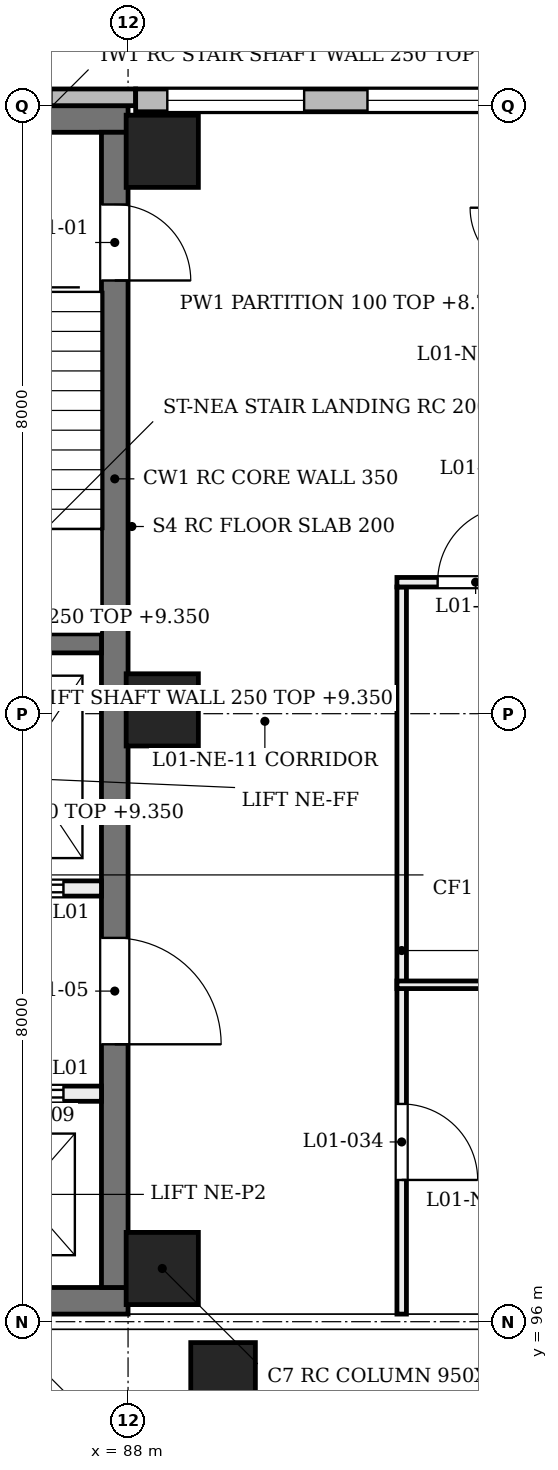
"""IFC4 building model, lengths in metres.
Left out: names, types, materials, properties, quantities, classifications, styles, units other than length and angle.
Written with IfcOpenShell. Run it as: python <this file> out.ifc"""

import sys

from ifc_helpers import new_model, si_unit, direction, frame, frame_2d, origin, origin_2d, place, context, subcontext, project, spatial, rectangle, extrude, element, fill, save


model = new_model("IFC4")
c1 = context("Model", 3, precision=1e-05, world=origin(), true_north=direction((0.0, 1.0)))
c2 = subcontext(c1, "Body", "Model", "MODEL_VIEW")
j1 = project(units=[si_unit("LENGTHUNIT", "METRE"), si_unit("PLANEANGLEUNIT", "RADIAN")], contexts=[c1])
p1 = place(None, origin())
s1 = spatial("IfcSite", under=j1, at=p1, CompositionType="ELEMENT")
p2 = place(p1, origin())
s2 = spatial("IfcBuilding", under=s1, at=p2, CompositionType="ELEMENT")
p3 = place(p2, frame((0.0, 0.0, 4.8)))
s3 = spatial("IfcBuildingStorey", under=s2, at=p3, CompositionType="ELEMENT", Elevation=4.8)
for number, where, z_axis, x_axis in (
    (1, (80.1, 96.275, 0.0), (0.0, 0.0, 1.0), (1.0, 0.0, 0.0)),
    (2, (80.1, 111.825, 0.0), (0.0, 0.0, 1.0), (1.0, 0.0, 0.0)),
):
    element("IfcWall", number, at=place(p3, frame(where, z_axis=z_axis, x_axis=x_axis)), inside=s3, PredefinedType="SHEAR", context=c2, shape_type="SweptSolid", body=[
        extrude(rectangle(XDim=7.9, YDim=0.35, at=frame_2d((3.95, 0.0))), origin(), (0.0, 0.0, 1.0), 4.58),
    ])
p4 = place(p3, frame((87.825, 96.45, 0.0), z_axis=(0.0, 0.0, 1.0), x_axis=(0.0, 1.0, 0.0)))
e3 = element("IfcWall", 3, at=p4, inside=s3, PredefinedType="SHEAR", context=c2, shape_type="SweptSolid", body=[
    extrude(rectangle(XDim=15.2, YDim=0.35, at=frame_2d((7.6, 0.0))), origin(), (0.0, 0.0, 1.0), 4.58),
])
p5 = place(p4, frame((13.25, 0.0, 0.0)))
e4 = element("IfcOpeningElement", 4, at=p5, cuts=e3, PredefinedType="OPENING", context=c2, shape_type="SweptSolid", body=[
    extrude(rectangle(XDim=1.0, YDim=2.1, at=frame_2d((0.5, 1.05))), frame((0.0, 0.185, 0.0), z_axis=(0.0, -1.0, 0.0), x_axis=(1.0, 0.0, 0.0)), (0.0, 0.0, 1.0), 0.37),
])
p6 = place(p4, frame((3.2, 0.0, 0.0)))
e5 = element("IfcOpeningElement", 5, at=p6, cuts=e3, PredefinedType="OPENING", context=c2, shape_type="SweptSolid", body=[
    extrude(rectangle(XDim=1.4, YDim=2.1, at=frame_2d((0.7, 1.05))), frame((0.0, 0.185, 0.0), z_axis=(0.0, -1.0, 0.0), x_axis=(1.0, 0.0, 0.0)), (0.0, 0.0, 1.0), 0.37),
])
for number, where, z_axis, x_axis in (
    (6, (88.45, 96.7, 0.0), (0.0, 0.0, 1.0), (1.0, 0.0, 0.0)),
    (7, (88.45, 104.05, 0.0), (0.0, 0.0, 1.0), (1.0, 0.0, 0.0)),
    (8, (88.45, 111.4, 0.0), (0.0, 0.0, 1.0), (1.0, 0.0, 0.0)),
):
    element("IfcColumn", number, at=place(p3, frame(where, z_axis=z_axis, x_axis=x_axis)), inside=s3, PredefinedType="COLUMN", context=c2, shape_type="SweptSolid", body=[
        extrude(rectangle(XDim=0.95, YDim=0.95, at=origin_2d()), origin(), (0.0, 0.0, 1.0), 4.8),
    ])
p7 = place(p3, frame((89.0, 95.3, 0.0), z_axis=(0.203952265704, 0.0, 0.978980833987), x_axis=(0.0, 1.0, 0.0)))
e9 = element("IfcColumn", 9, at=p7, inside=s3, PredefinedType="COLUMN", context=c2, shape_type="SweptSolid", body=[
    extrude(rectangle(XDim=0.85, YDim=0.85, at=origin_2d()), origin(), (0.0, 0.0, 1.0), 4.903),
])
p8 = place(p3, frame((79.9, 112.11, 0.0), z_axis=(0.0, 0.0, 1.0), x_axis=(1.0, 0.0, 0.0)))
e10 = element("IfcWall", 10, at=p8, inside=s3, PredefinedType="SOLIDWALL", context=c2, shape_type="SweptSolid", body=[
    extrude(rectangle(XDim=8.2, YDim=0.22, at=frame_2d((4.1, 0.0))), origin(), (0.0, 0.0, 1.0), 3.9),
])
p9 = place(p8, frame((1.308, 0.0, 0.9)))
e11 = element("IfcOpeningElement", 11, at=p9, cuts=e10, PredefinedType="OPENING", context=c2, shape_type="SweptSolid", body=[
    extrude(rectangle(XDim=0.45, YDim=2.6, at=frame_2d((0.225, 1.3))), frame((0.0, 0.12, 0.0), z_axis=(0.0, -1.0, 0.0), x_axis=(1.0, 0.0, 0.0)), (0.0, 0.0, 1.0), 0.24),
])
p10 = place(p8, frame((3.975, 0.0, 0.9)))
e12 = element("IfcOpeningElement", 12, at=p10, cuts=e10, PredefinedType="OPENING", context=c2, shape_type="SweptSolid", body=[
    extrude(rectangle(XDim=0.45, YDim=2.6, at=frame_2d((0.225, 1.3))), frame((0.0, 0.12, 0.0), z_axis=(0.0, -1.0, 0.0), x_axis=(1.0, 0.0, 0.0)), (0.0, 0.0, 1.0), 0.24),
])
p11 = place(p8, frame((6.642, 0.0, 0.9)))
e13 = element("IfcOpeningElement", 13, at=p11, cuts=e10, PredefinedType="OPENING", context=c2, shape_type="SweptSolid", body=[
    extrude(rectangle(XDim=0.45, YDim=2.6, at=frame_2d((0.225, 1.3))), frame((0.0, 0.12, 0.0), z_axis=(0.0, -1.0, 0.0), x_axis=(1.0, 0.0, 0.0)), (0.0, 0.0, 1.0), 0.24),
])
p12 = place(p3, frame((88.1, 112.07, 0.0), z_axis=(0.0, 0.0, 1.0), x_axis=(1.0, 0.0, 0.0)))
e14 = element("IfcWall", 14, at=p12, inside=s3, PredefinedType="SOLIDWALL", context=c2, shape_type="SweptSolid", body=[
    extrude(rectangle(XDim=7.9, YDim=0.3, at=frame_2d((3.95, 0.0))), origin(), (0.0, 0.0, 1.0), 3.9),
])
p13 = place(p12, frame((0.417, 0.0, 0.75)))
e15 = element("IfcOpeningElement", 15, at=p13, cuts=e14, PredefinedType="OPENING", context=c2, shape_type="SweptSolid", body=[
    extrude(rectangle(XDim=1.8, YDim=3.1, at=frame_2d((0.9, 1.55))), frame((0.0, 0.16, 0.0), z_axis=(0.0, -1.0, 0.0), x_axis=(1.0, 0.0, 0.0)), (0.0, 0.0, 1.0), 0.32),
])
p14 = place(p12, frame((3.05, 0.0, 0.75)))
e16 = element("IfcOpeningElement", 16, at=p14, cuts=e14, PredefinedType="OPENING", context=c2, shape_type="SweptSolid", body=[
    extrude(rectangle(XDim=1.8, YDim=3.1, at=frame_2d((0.9, 1.55))), frame((0.0, 0.16, 0.0), z_axis=(0.0, -1.0, 0.0), x_axis=(1.0, 0.0, 0.0)), (0.0, 0.0, 1.0), 0.32),
])
p15 = place(p12, frame((5.683, 0.0, 0.75)))
e17 = element("IfcOpeningElement", 17, at=p15, cuts=e14, PredefinedType="OPENING", context=c2, shape_type="SweptSolid", body=[
    extrude(rectangle(XDim=1.8, YDim=3.1, at=frame_2d((0.9, 1.55))), frame((0.0, 0.16, 0.0), z_axis=(0.0, -1.0, 0.0), x_axis=(1.0, 0.0, 0.0)), (0.0, 0.0, 1.0), 0.32),
])
p16 = place(p3, frame((87.65, 104.925, 0.0), z_axis=(0.0, 0.0, 1.0), x_axis=(-1.0, 0.0, 0.0)))
e18 = element("IfcWall", 18, at=p16, inside=s3, PredefinedType="SOLIDWALL", context=c2, shape_type="SweptSolid", body=[
    extrude(rectangle(XDim=3.1, YDim=0.25, at=frame_2d((1.55, 0.0))), origin(), (0.0, 0.0, 1.0), 4.55),
])
p17 = place(p3, frame((87.65, 101.7, 0.0), z_axis=(0.0, 0.0, 1.0), x_axis=(-1.0, 0.0, 0.0)))
e19 = element("IfcWall", 19, at=p17, inside=s3, PredefinedType="SOLIDWALL", context=c2, shape_type="SweptSolid", body=[
    extrude(rectangle(XDim=7.2, YDim=0.2, at=frame_2d((3.6, 0.0))), origin(), (0.0, 0.0, 1.0), 4.55),
])
p18 = place(p17, frame((0.5, 0.0, 0.0)))
e20 = element("IfcOpeningElement", 20, at=p18, cuts=e19, PredefinedType="OPENING", context=c2, shape_type="SweptSolid", body=[
    extrude(rectangle(XDim=1.1, YDim=2.1, at=frame_2d((0.55, 1.05))), frame((0.0, 0.11, 0.0), z_axis=(0.0, -1.0, 0.0), x_axis=(1.0, 0.0, 0.0)), (0.0, 0.0, 1.0), 0.22),
])
p19 = place(p17, frame((5.6, 0.0, 0.0)))
e21 = element("IfcOpeningElement", 21, at=p19, cuts=e19, PredefinedType="OPENING", context=c2, shape_type="SweptSolid", body=[
    extrude(rectangle(XDim=1.1, YDim=2.1, at=frame_2d((0.55, 1.05))), frame((0.0, 0.11, 0.0), z_axis=(0.0, -1.0, 0.0), x_axis=(1.0, 0.0, 0.0)), (0.0, 0.0, 1.0), 0.22),
])
p20 = place(p17, frame((3.1, 0.0, 0.0)))
e22 = element("IfcOpeningElement", 22, at=p20, cuts=e19, PredefinedType="OPENING", context=c2, shape_type="SweptSolid", body=[
    extrude(rectangle(XDim=1.0, YDim=2.1, at=frame_2d((0.5, 1.05))), frame((0.0, 0.11, 0.0), z_axis=(0.0, -1.0, 0.0), x_axis=(1.0, 0.0, 0.0)), (0.0, 0.0, 1.0), 0.22),
])
p21 = place(p3, frame((87.65, 99.0, 0.0), z_axis=(0.0, 0.0, 1.0), x_axis=(-1.0, 0.0, 0.0)))
e23 = element("IfcWall", 23, at=p21, inside=s3, PredefinedType="SOLIDWALL", context=c2, shape_type="SweptSolid", body=[
    extrude(rectangle(XDim=7.2, YDim=0.2, at=frame_2d((3.6, 0.0))), origin(), (0.0, 0.0, 1.0), 4.55),
])
p22 = place(p21, frame((0.5, 0.0, 0.0)))
e24 = element("IfcOpeningElement", 24, at=p22, cuts=e23, PredefinedType="OPENING", context=c2, shape_type="SweptSolid", body=[
    extrude(rectangle(XDim=1.1, YDim=2.1, at=frame_2d((0.55, 1.05))), frame((0.0, 0.11, 0.0), z_axis=(0.0, -1.0, 0.0), x_axis=(1.0, 0.0, 0.0)), (0.0, 0.0, 1.0), 0.22),
])
p23 = place(p21, frame((5.6, 0.0, 0.0)))
e25 = element("IfcOpeningElement", 25, at=p23, cuts=e23, PredefinedType="OPENING", context=c2, shape_type="SweptSolid", body=[
    extrude(rectangle(XDim=1.1, YDim=2.1, at=frame_2d((0.55, 1.05))), frame((0.0, 0.11, 0.0), z_axis=(0.0, -1.0, 0.0), x_axis=(1.0, 0.0, 0.0)), (0.0, 0.0, 1.0), 0.22),
])
p24 = place(p21, frame((3.1, 0.0, 0.0)))
e26 = element("IfcOpeningElement", 26, at=p24, cuts=e23, PredefinedType="OPENING", context=c2, shape_type="SweptSolid", body=[
    extrude(rectangle(XDim=1.0, YDim=2.1, at=frame_2d((0.5, 1.05))), frame((0.0, 0.11, 0.0), z_axis=(0.0, -1.0, 0.0), x_axis=(1.0, 0.0, 0.0)), (0.0, 0.0, 1.0), 0.22),
])
p25 = place(p3, frame((91.6, 96.1, 0.0), z_axis=(0.0, 0.0, 1.0), x_axis=(0.0, 1.0, 0.0)))
e27 = element("IfcWall", 27, at=p25, inside=s3, PredefinedType="PARTITIONING", context=c2, shape_type="SweptSolid", body=[
    extrude(rectangle(XDim=9.567, YDim=0.125, at=frame_2d((4.783, 0.0))), origin(), (0.0, 0.0, 1.0), 3.88),
])
p26 = place(p25, frame((1.765, 0.0, 0.0)))
e28 = element("IfcOpeningElement", 28, at=p26, cuts=e27, PredefinedType="OPENING", context=c2, shape_type="SweptSolid", body=[
    extrude(rectangle(XDim=1.0, YDim=2.1, at=frame_2d((0.5, 1.05))), frame((0.0, 0.073, 0.0), z_axis=(0.0, -1.0, 0.0), x_axis=(1.0, 0.0, 0.0)), (0.0, 0.0, 1.0), 0.145),
])
p27 = place(p3, frame((91.538, 100.433, 0.0), z_axis=(0.0, 0.0, 1.0), x_axis=(1.0, 0.0, 0.0)))
e29 = element("IfcWall", 29, at=p27, inside=s3, PredefinedType="PARTITIONING", context=c2, shape_type="SweptSolid", body=[
    extrude(rectangle(XDim=4.162, YDim=0.1, at=frame_2d((2.081, 0.0))), origin(), (0.0, 0.0, 1.0), 3.98),
])
p28 = place(p3, frame((91.538, 105.73, 0.0), z_axis=(0.0, 0.0, 1.0), x_axis=(1.0, 0.0, 0.0)))
e30 = element("IfcWall", 30, at=p28, inside=s3, PredefinedType="PARTITIONING", context=c2, shape_type="SweptSolid", body=[
    extrude(rectangle(XDim=1.925, YDim=0.125, at=frame_2d((0.962, 0.0))), origin(), (0.0, 0.0, 1.0), 4.56),
])
p29 = place(p28, frame((0.535, 0.0, 0.0)))
e31 = element("IfcOpeningElement", 31, at=p29, cuts=e30, PredefinedType="OPENING", context=c2, shape_type="SweptSolid", body=[
    extrude(rectangle(XDim=1.0, YDim=2.1, at=frame_2d((0.5, 1.05))), frame((0.0, 0.073, 0.0), z_axis=(0.0, -1.0, 0.0), x_axis=(1.0, 0.0, 0.0)), (0.0, 0.0, 1.0), 0.145),
])
p30 = place(p13, origin())
e32 = element("IfcWindow", 32, at=p30, inside=s3, PartitioningType="SINGLE_PANEL", PredefinedType="WINDOW", context=c2, shape_type="SweptSolid", body=[
    extrude(rectangle(XDim=1.8, YDim=3.1, at=frame_2d((0.9, 1.55))), frame((0.0, 0.03, 0.0), z_axis=(0.0, -1.0, 0.0), x_axis=(1.0, 0.0, 0.0)), (0.0, 0.0, 1.0), 0.06),
])
fill(e15, e32)
p31 = place(p14, origin())
e33 = element("IfcWindow", 33, at=p31, inside=s3, PartitioningType="SINGLE_PANEL", PredefinedType="WINDOW", context=c2, shape_type="SweptSolid", body=[
    extrude(rectangle(XDim=1.8, YDim=3.1, at=frame_2d((0.9, 1.55))), frame((0.0, 0.03, 0.0), z_axis=(0.0, -1.0, 0.0), x_axis=(1.0, 0.0, 0.0)), (0.0, 0.0, 1.0), 0.06),
])
fill(e16, e33)
p32 = place(p5, frame((1.0, 0.0, 0.0), z_axis=(0.0, 0.0, 1.0), x_axis=(-1.0, 0.0, 0.0)))
e34 = element("IfcDoor", 34, at=p32, inside=s3, OperationType="SINGLE_SWING_LEFT", PredefinedType="DOOR", context=c2, shape_type="SweptSolid", body=[
    extrude(rectangle(XDim=1.0, YDim=2.1, at=frame_2d((0.5, 1.05))), frame((0.0, 0.025, 0.0), z_axis=(0.0, -1.0, 0.0), x_axis=(1.0, 0.0, 0.0)), (0.0, 0.0, 1.0), 0.05),
])
fill(e4, e34)
p33 = place(p18, origin())
e35 = element("IfcDoor", 35, at=p33, inside=s3, OperationType="DOUBLE_DOOR_SLIDING", PredefinedType="DOOR", context=c2, shape_type="SweptSolid", body=[
    extrude(rectangle(XDim=1.1, YDim=2.1, at=frame_2d((0.55, 1.05))), frame((0.0, 0.025, 0.0), z_axis=(0.0, -1.0, 0.0), x_axis=(1.0, 0.0, 0.0)), (0.0, 0.0, 1.0), 0.05),
])
fill(e20, e35)
p34 = place(p22, frame((1.1, 0.0, 0.0), z_axis=(0.0, 0.0, 1.0), x_axis=(-1.0, 0.0, 0.0)))
e36 = element("IfcDoor", 36, at=p34, inside=s3, OperationType="DOUBLE_DOOR_SLIDING", PredefinedType="DOOR", context=c2, shape_type="SweptSolid", body=[
    extrude(rectangle(XDim=1.1, YDim=2.1, at=frame_2d((0.55, 1.05))), frame((0.0, 0.025, 0.0), z_axis=(0.0, -1.0, 0.0), x_axis=(1.0, 0.0, 0.0)), (0.0, 0.0, 1.0), 0.05),
])
fill(e24, e36)
p35 = place(p6, frame((1.4, 0.0, 0.0), z_axis=(0.0, 0.0, 1.0), x_axis=(-1.0, 0.0, 0.0)))
e37 = element("IfcDoor", 37, at=p35, inside=s3, OperationType="SINGLE_SWING_LEFT", PredefinedType="DOOR", context=c2, shape_type="SweptSolid", body=[
    extrude(rectangle(XDim=1.4, YDim=2.1, at=frame_2d((0.7, 1.05))), frame((0.0, 0.025, 0.0), z_axis=(0.0, -1.0, 0.0), x_axis=(1.0, 0.0, 0.0)), (0.0, 0.0, 1.0), 0.05),
])
fill(e5, e37)
p36 = place(p29, frame((1.0, 0.0, 0.0), z_axis=(0.0, 0.0, 1.0), x_axis=(-1.0, 0.0, 0.0)))
e38 = element("IfcDoor", 38, at=p36, inside=s3, OperationType="SINGLE_SWING_RIGHT", PredefinedType="DOOR", context=c2, shape_type="SweptSolid", body=[
    extrude(rectangle(XDim=1.0, YDim=2.1, at=frame_2d((0.5, 1.05))), frame((0.0, 0.025, 0.0), z_axis=(0.0, -1.0, 0.0), x_axis=(1.0, 0.0, 0.0)), (0.0, 0.0, 1.0), 0.05),
])
fill(e31, e38)
p37 = place(p26, frame((1.0, 0.0, 0.0), z_axis=(0.0, 0.0, 1.0), x_axis=(-1.0, 0.0, 0.0)))
e39 = element("IfcDoor", 39, at=p37, inside=s3, OperationType="SINGLE_SWING_LEFT", PredefinedType="DOOR", context=c2, shape_type="SweptSolid", body=[
    extrude(rectangle(XDim=1.0, YDim=2.1, at=frame_2d((0.5, 1.05))), frame((0.0, 0.025, 0.0), z_axis=(0.0, -1.0, 0.0), x_axis=(1.0, 0.0, 0.0)), (0.0, 0.0, 1.0), 0.05),
])
fill(e28, e39)
save(model, sys.argv[1])
